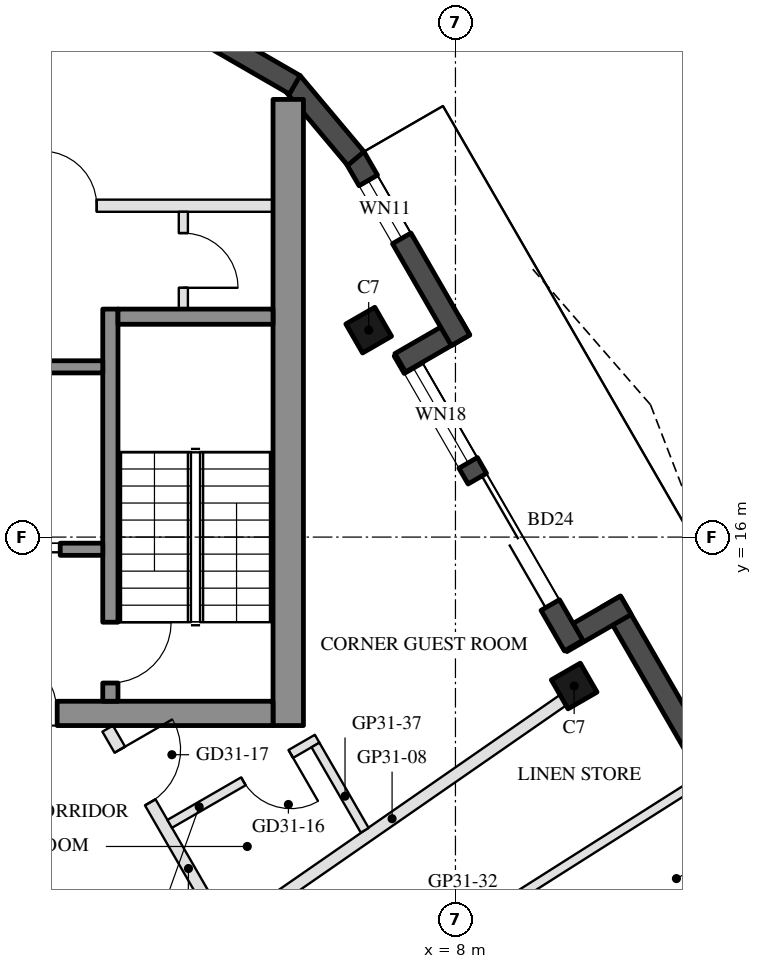
"""IFC4 building model, lengths in metres.
Left out: names, types, materials, properties, quantities, classifications, styles, units other than length and angle.
Written with IfcOpenShell. Run it as: python <this file> out.ifc"""

import sys

from ifc_helpers import new_model, si_unit, direction, frame, frame_2d, origin, origin_2d, place, context, subcontext, project, spatial, rectangle, hollow_rectangle, extrude, boolean, halfspace, element, fill, save


model = new_model("IFC4")
c1 = context("Model", 3, precision=1e-05, world=origin(), true_north=direction((0.0, 1.0)))
c2 = subcontext(c1, "Body", "Model", "MODEL_VIEW")
j1 = project(units=[si_unit("LENGTHUNIT", "METRE"), si_unit("PLANEANGLEUNIT", "RADIAN")], contexts=[c1])
p1 = place(None, origin())
s1 = spatial("IfcSite", under=j1, at=p1, CompositionType="ELEMENT")
p2 = place(p1, origin())
s2 = spatial("IfcBuilding", under=s1, at=p2, CompositionType="ELEMENT")
p3 = place(p2, frame((0.0, 0.0, 302.2)))
s3 = spatial("IfcBuildingStorey", under=s2, at=p3, CompositionType="ELEMENT", Elevation=302.2)
p4 = place(p3, frame((9.953, 13.551, 0.0), z_axis=(0.0, 0.0, 1.0), x_axis=(-0.5, 0.866025403784, 0.0)))
e1 = element("IfcColumn", 1, at=p4, inside=s3, PredefinedType="COLUMN", context=c2, shape_type="SweptSolid", body=[
    boolean("DIFFERENCE", extrude(hollow_rectangle(XDim=0.55, YDim=0.55, WallThickness=0.025, at=origin_2d()), origin(), (0.0, 0.0, 1.0), 3.7), halfspace(frame((0.0, 0.0, 0.034), z_axis=(0.0, 0.0, 1.0), x_axis=(1.0, 0.0, 0.0)), True)),
])
p5 = place(p3, frame((6.573, 19.404, 0.0), z_axis=(0.0, 0.0, 1.0), x_axis=(-0.5, 0.866025403784, 0.0)))
e2 = element("IfcColumn", 2, at=p5, inside=s3, PredefinedType="COLUMN", context=c2, shape_type="SweptSolid", body=[
    boolean("DIFFERENCE", extrude(hollow_rectangle(XDim=0.55, YDim=0.55, WallThickness=0.025, at=origin_2d()), origin(), (0.0, 0.0, 1.0), 3.7), halfspace(frame((0.0, 0.0, 0.04), z_axis=(0.0, 0.0, 1.0), x_axis=(1.0, 0.0, 0.0)), True)),
])
p6 = place(p3, frame((14.843, 7.531, 0.0), z_axis=(0.0, 0.0, 1.0), x_axis=(-0.500013816581, 0.866017426631, 0.0)))
e3 = element("IfcWall", 3, at=p6, inside=s3, PredefinedType="SOLIDWALL", context=c2, shape_type="SweptSolid", body=[
    extrude(rectangle(XDim=8.559, YDim=0.35, at=frame_2d((4.279, 0.0))), origin(), (0.0, 0.0, 1.0), 3.55),
])
p7 = place(p6, frame((1.525, 0.0, 0.3)))
e4 = element("IfcOpeningElement", 4, at=p7, cuts=e3, PredefinedType="OPENING", context=c2, shape_type="SweptSolid", body=[
    extrude(rectangle(XDim=0.9, YDim=2.65, at=frame_2d((0.45, 1.325))), frame((0.0, 0.185, 0.0), z_axis=(0.0, -1.0, 0.0), x_axis=(1.0, 0.0, 0.0)), (0.0, 0.0, 1.0), 0.37),
])
p8 = place(p3, frame((10.802, 14.879, 0.0), z_axis=(0.0, 0.0, 1.0), x_axis=(-0.866005645448, -0.500034220881, 0.0)))
e5 = element("IfcWall", 5, at=p8, inside=s3, PredefinedType="SOLIDWALL", context=c2, shape_type="SweptSolid", body=[
    extrude(rectangle(XDim=1.22, YDim=0.35, at=frame_2d((0.61, 0.0))), origin(), (0.0, 0.0, 1.0), 3.55),
])
p9 = place(p3, frame((9.944, 14.216, 0.0), z_axis=(0.0, 0.0, 1.0), x_axis=(-0.500026936782, 0.866009851268, 0.0)))
e6 = element("IfcWall", 6, at=p9, inside=s3, PredefinedType="SOLIDWALL", context=c2, shape_type="SweptSolid", body=[
    extrude(rectangle(XDim=5.599, YDim=0.35, at=frame_2d((2.799, 0.0))), origin(), (0.0, 0.0, 1.0), 3.55),
])
p10 = place(p9, frame((0.77, 0.0, 0.0)))
e7 = element("IfcOpeningElement", 7, at=p10, cuts=e6, PredefinedType="OPENING", context=c2, shape_type="SweptSolid", body=[
    extrude(rectangle(XDim=2.4, YDim=2.4, at=frame_2d((1.2, 1.2))), frame((0.0, 0.185, 0.0), z_axis=(0.0, -1.0, 0.0), x_axis=(1.0, 0.0, 0.0)), (0.0, 0.0, 1.0), 0.37),
])
p11 = place(p9, frame((3.47, 0.0, 0.3)))
e8 = element("IfcOpeningElement", 8, at=p11, cuts=e6, PredefinedType="OPENING", context=c2, shape_type="SweptSolid", body=[
    extrude(rectangle(XDim=1.8, YDim=2.65, at=frame_2d((0.9, 1.325))), frame((0.0, 0.185, 0.0), z_axis=(0.0, -1.0, 0.0), x_axis=(1.0, 0.0, 0.0)), (0.0, 0.0, 1.0), 0.37),
])
p12 = place(p3, frame((7.092, 18.866, 0.0), z_axis=(0.0, 0.0, 1.0), x_axis=(0.866005645448, 0.500034220881, 0.0)))
e9 = element("IfcWall", 9, at=p12, inside=s3, PredefinedType="SOLIDWALL", context=c2, shape_type="SweptSolid", body=[
    extrude(rectangle(XDim=1.22, YDim=0.35, at=frame_2d((0.61, 0.0))), origin(), (0.0, 0.0, 1.0), 3.55),
])
p13 = place(p3, frame((8.084, 19.237, 0.0), z_axis=(0.0, 0.0, 1.0), x_axis=(-0.499949154193, 0.866054757635, 0.0)))
e10 = element("IfcWall", 10, at=p13, inside=s3, PredefinedType="SOLIDWALL", context=c2, shape_type="SweptSolid", body=[
    extrude(rectangle(XDim=3.48, YDim=0.35, at=frame_2d((1.74, 0.0))), origin(), (0.0, 0.0, 1.0), 3.55),
])
p14 = place(p13, frame((1.935, 0.0, 0.3)))
e11 = element("IfcOpeningElement", 11, at=p14, cuts=e10, PredefinedType="OPENING", context=c2, shape_type="SweptSolid", body=[
    extrude(rectangle(XDim=1.1, YDim=2.65, at=frame_2d((0.55, 1.325))), frame((0.0, 0.185, 0.0), z_axis=(0.0, -1.0, 0.0), x_axis=(1.0, 0.0, 0.0)), (0.0, 0.0, 1.0), 0.37),
])
p15 = place(p3, frame((6.361, 22.226, 0.0), z_axis=(0.0, 0.0, 1.0), x_axis=(-0.642782014883, 0.766049137682, 0.0)))
e12 = element("IfcWall", 12, at=p15, inside=s3, PredefinedType="SOLIDWALL", context=c2, shape_type="SweptSolid", body=[
    extrude(rectangle(XDim=1.634, YDim=0.35, at=frame_2d((0.817, 0.0))), origin(), (0.0, 0.0, 1.0), 3.55),
])
p16 = place(p3, frame((5.358, 23.439, 0.0), z_axis=(0.0, 0.0, 1.0), x_axis=(-0.866018903231, 0.500011259119, 0.0)))
e13 = element("IfcWall", 13, at=p16, inside=s3, PredefinedType="SOLIDWALL", context=c2, shape_type="SweptSolid", body=[
    extrude(rectangle(XDim=1.634, YDim=0.35, at=frame_2d((0.817, 0.0))), origin(), (0.0, 0.0, 1.0), 3.55),
])
p17 = place(p3, frame((5.25, 12.9, 0.0), z_axis=(0.0, 0.0, 1.0), x_axis=(0.0, 1.0, 0.0)))
e14 = element("IfcWall", 14, at=p17, inside=s3, PredefinedType="SHEAR", context=c2, shape_type="SweptSolid", body=[
    extrude(rectangle(XDim=10.299, YDim=0.5, at=frame_2d((5.149, 0.0))), origin(), (0.0, 0.0, 1.0), 3.5),
])
p18 = place(p3, frame((5.0, 13.1, 0.0), z_axis=(0.0, 0.0, 1.0), x_axis=(-1.0, 0.0, 0.0)))
e15 = element("IfcWall", 15, at=p18, inside=s3, PredefinedType="SHEAR", context=c2, shape_type="SweptSolid", body=[
    extrude(rectangle(XDim=10.0, YDim=0.4, at=frame_2d((5.0, 0.0))), origin(), (0.0, 0.0, 1.0), 3.5),
])
p19 = place(p18, frame((3.55, 0.0, 0.0)))
e16 = element("IfcOpeningElement", 16, at=p19, cuts=e15, PredefinedType="OPENING", context=c2, shape_type="SweptSolid", body=[
    extrude(rectangle(XDim=1.1, YDim=2.1, at=frame_2d((0.55, 1.05))), frame((0.0, 0.21, 0.0), z_axis=(0.0, -1.0, 0.0), x_axis=(1.0, 0.0, 0.0)), (0.0, 0.0, 1.0), 0.42),
])
p20 = place(p18, frame((5.85, 0.0, 0.0)))
e17 = element("IfcOpeningElement", 17, at=p20, cuts=e15, PredefinedType="OPENING", context=c2, shape_type="SweptSolid", body=[
    extrude(rectangle(XDim=1.4, YDim=2.1, at=frame_2d((0.7, 1.05))), frame((0.0, 0.21, 0.0), z_axis=(0.0, -1.0, 0.0), x_axis=(1.0, 0.0, 0.0)), (0.0, 0.0, 1.0), 0.42),
])
p21 = place(p3, frame((2.325, 13.3, 0.0), z_axis=(0.0, 0.0, 1.0), x_axis=(0.0, 1.0, 0.0)))
e18 = element("IfcWall", 18, at=p21, inside=s3, PredefinedType="SHEAR", context=c2, shape_type="SweptSolid", body=[
    extrude(rectangle(XDim=6.45, YDim=0.25, at=frame_2d((3.225, 0.0))), origin(), (0.0, 0.0, 1.0), 3.5),
])
p22 = place(p21, frame((0.3, 0.0, 0.0)))
e19 = element("IfcOpeningElement", 19, at=p22, cuts=e18, PredefinedType="OPENING", context=c2, shape_type="SweptSolid", body=[
    extrude(rectangle(XDim=1.0, YDim=2.1, at=frame_2d((0.5, 1.05))), frame((0.0, 0.135, 0.0), z_axis=(0.0, -1.0, 0.0), x_axis=(1.0, 0.0, 0.0)), (0.0, 0.0, 1.0), 0.27),
])
p23 = place(p3, frame((5.0, 19.625, 0.0), z_axis=(0.0, 0.0, 1.0), x_axis=(-1.0, 0.0, 0.0)))
e20 = element("IfcWall", 20, at=p23, inside=s3, PredefinedType="SHEAR", context=c2, shape_type="SweptSolid", body=[
    extrude(rectangle(XDim=2.55, YDim=0.25, at=frame_2d((1.275, 0.0))), origin(), (0.0, 0.0, 1.0), 3.5),
])
p24 = place(p3, frame((2.2, 18.8, 0.0), z_axis=(0.0, 0.0, 1.0), x_axis=(-1.0, 0.0, 0.0)))
e21 = element("IfcWall", 21, at=p24, inside=s3, PredefinedType="SHEAR", context=c2, shape_type="SweptSolid", body=[
    extrude(rectangle(XDim=2.8, YDim=0.2, at=frame_2d((1.4, 0.0))), origin(), (0.0, 0.0, 1.0), 3.5),
])
p25 = place(p3, frame((2.2, 15.8, 0.0), z_axis=(0.0, 0.0, 1.0), x_axis=(-1.0, 0.0, 0.0)))
e22 = element("IfcWall", 22, at=p25, inside=s3, PredefinedType="SHEAR", context=c2, shape_type="SweptSolid", body=[
    extrude(rectangle(XDim=2.8, YDim=0.2, at=frame_2d((1.4, 0.0))), origin(), (0.0, 0.0, 1.0), 3.5),
])
p26 = place(p25, frame((0.7, 0.0, 0.0)))
e23 = element("IfcOpeningElement", 23, at=p26, cuts=e22, PredefinedType="OPENING", context=c2, shape_type="SweptSolid", body=[
    extrude(rectangle(XDim=1.2, YDim=2.1, at=frame_2d((0.6, 1.05))), frame((0.0, 0.11, 0.0), z_axis=(0.0, -1.0, 0.0), x_axis=(1.0, 0.0, 0.0)), (0.0, 0.0, 1.0), 0.22),
])
p27 = place(p3, frame((5.0, 21.45, 0.0), z_axis=(0.0, 0.0, 1.0), x_axis=(-1.0, 0.0, 0.0)))
e24 = element("IfcWall", 24, at=p27, inside=s3, PredefinedType="PARTITIONING", context=c2, shape_type="SweptSolid", body=[
    extrude(rectangle(XDim=5.4, YDim=0.2, at=frame_2d((2.7, 0.0))), origin(), (0.0, 0.0, 1.0), 3.5),
])
p28 = place(p27, frame((2.9, 0.0, 0.0)))
e25 = element("IfcOpeningElement", 25, at=p28, cuts=e24, PredefinedType="OPENING", context=c2, shape_type="SweptSolid", body=[
    extrude(rectangle(XDim=0.9, YDim=2.1, at=frame_2d((0.45, 1.05))), frame((0.0, 0.11, 0.0), z_axis=(0.0, -1.0, 0.0), x_axis=(1.0, 0.0, 0.0)), (0.0, 0.0, 1.0), 0.22),
])
p29 = place(p3, frame((3.525, 19.75, 0.0), z_axis=(0.0, 0.0, 1.0), x_axis=(0.0, 1.0, 0.0)))
e26 = element("IfcWall", 26, at=p29, inside=s3, PredefinedType="PARTITIONING", context=c2, shape_type="SweptSolid", body=[
    extrude(rectangle(XDim=1.6, YDim=0.15, at=frame_2d((0.8, 0.0))), origin(), (0.0, 0.0, 1.0), 3.5),
])
p30 = place(p29, frame((0.35, 0.0, 0.0)))
e27 = element("IfcOpeningElement", 27, at=p30, cuts=e26, PredefinedType="OPENING", context=c2, shape_type="SweptSolid", body=[
    extrude(rectangle(XDim=0.9, YDim=2.1, at=frame_2d((0.45, 1.05))), frame((0.0, 0.085, 0.0), z_axis=(0.0, -1.0, 0.0), x_axis=(1.0, 0.0, 0.0)), (0.0, 0.0, 1.0), 0.17),
])
p31 = place(p3, frame((9.769, 13.318, 0.0), z_axis=(0.0, 0.0, 1.0), x_axis=(-0.821728251777, -0.569879531332, 0.0)))
e28 = element("IfcWall", 28, at=p31, inside=s3, PredefinedType="PARTITIONING", context=c2, shape_type="SweptSolid", body=[
    extrude(rectangle(XDim=6.843, YDim=0.2, at=frame_2d((3.421, 0.0))), origin(), (0.0, 0.0, 1.0), 3.1),
])
p32 = place(p3, frame((12.052, 12.015, 0.0), z_axis=(0.0, 0.0, 1.0), x_axis=(-0.844566720388, -0.535450328987, 0.0)))
e29 = element("IfcWall", 29, at=p32, inside=s3, PredefinedType="PARTITIONING", context=c2, shape_type="SweptSolid", body=[
    extrude(rectangle(XDim=8.152, YDim=0.15, at=frame_2d((4.076, 0.0))), origin(), (0.0, 0.0, 1.0), 3.16),
])
p33 = place(p3, frame((2.281, 12.85, 0.0), z_axis=(0.0, 0.0, 1.0), x_axis=(0.500019354728, -0.866014229038, 0.0)))
e30 = element("IfcWall", 30, at=p33, inside=s3, PredefinedType="PARTITIONING", context=c2, shape_type="SweptSolid", body=[
    extrude(rectangle(XDim=3.796, YDim=0.2, at=frame_2d((1.898, 0.0))), origin(), (0.0, 0.0, 1.0), 3.1),
])
p34 = place(p33, frame((0.4, 0.0, 0.0)))
e31 = element("IfcOpeningElement", 31, at=p34, cuts=e30, PredefinedType="OPENING", context=c2, shape_type="SweptSolid", body=[
    extrude(rectangle(XDim=1.0, YDim=2.1, at=frame_2d((0.5, 1.05))), frame((0.0, 0.11, 0.0), z_axis=(0.0, -1.0, 0.0), x_axis=(1.0, 0.0, 0.0)), (0.0, 0.0, 1.0), 0.22),
])
p35 = place(p3, frame((5.725, 12.683, 0.0), z_axis=(0.0, 0.0, 1.0), x_axis=(-0.866034573852, -0.49998411664, 0.0)))
e32 = element("IfcWall", 32, at=p35, inside=s3, PredefinedType="PARTITIONING", context=c2, shape_type="SweptSolid", body=[
    extrude(rectangle(XDim=2.8, YDim=0.15, at=frame_2d((1.4, 0.0))), origin(), (0.0, 0.0, 1.0), 3.55),
])
p36 = place(p35, frame((0.5, 0.0, 0.0)))
e33 = element("IfcOpeningElement", 33, at=p36, cuts=e32, PredefinedType="OPENING", context=c2, shape_type="SweptSolid", body=[
    extrude(rectangle(XDim=0.9, YDim=2.1, at=frame_2d((0.45, 1.05))), frame((0.0, 0.085, 0.0), z_axis=(0.0, -1.0, 0.0), x_axis=(1.0, 0.0, 0.0)), (0.0, 0.0, 1.0), 0.17),
])
p37 = place(p3, frame((6.508, 11.178, 0.0), z_axis=(0.0, 0.0, 1.0), x_axis=(-0.500061642096, 0.865989811779, 0.0)))
e34 = element("IfcWall", 34, at=p37, inside=s3, PredefinedType="PARTITIONING", context=c2, shape_type="SweptSolid", body=[
    extrude(rectangle(XDim=1.62, YDim=0.15, at=frame_2d((0.81, 0.0))), origin(), (0.0, 0.0, 1.0), 3.1),
])
p38 = place(p10, frame((2.4, 0.0, 0.0), z_axis=(0.0, 0.0, 1.0), x_axis=(-1.0, 0.0, 0.0)))
e35 = element("IfcDoor", 35, at=p38, inside=s3, OperationType="SLIDING_TO_LEFT", PredefinedType="DOOR", context=c2, shape_type="SweptSolid", body=[
    extrude(rectangle(XDim=2.4, YDim=2.4, at=frame_2d((1.2, 1.2))), frame((0.0, 0.025, 0.0), z_axis=(0.0, -1.0, 0.0), x_axis=(1.0, 0.0, 0.0)), (0.0, 0.0, 1.0), 0.05),
])
fill(e7, e35)
p39 = place(p11, origin())
e36 = element("IfcWindow", 36, at=p39, inside=s3, PartitioningType="SINGLE_PANEL", PredefinedType="WINDOW", context=c2, shape_type="SweptSolid", body=[
    extrude(rectangle(XDim=1.8, YDim=2.65, at=frame_2d((0.9, 1.325))), frame((0.0, 0.03, 0.0), z_axis=(0.0, -1.0, 0.0), x_axis=(1.0, 0.0, 0.0)), (0.0, 0.0, 1.0), 0.06),
])
fill(e8, e36)
p40 = place(p14, origin())
e37 = element("IfcWindow", 37, at=p40, inside=s3, PartitioningType="SINGLE_PANEL", PredefinedType="WINDOW", context=c2, shape_type="SweptSolid", body=[
    extrude(rectangle(XDim=1.1, YDim=2.65, at=frame_2d((0.55, 1.325))), frame((0.0, 0.03, 0.0), z_axis=(0.0, -1.0, 0.0), x_axis=(1.0, 0.0, 0.0)), (0.0, 0.0, 1.0), 0.06),
])
fill(e11, e37)
p41 = place(p26, origin())
e38 = element("IfcDoor", 38, at=p41, inside=s3, OperationType="DOUBLE_DOOR_SLIDING", PredefinedType="DOOR", context=c2, shape_type="SweptSolid", body=[
    extrude(rectangle(XDim=1.2, YDim=2.1, at=frame_2d((0.6, 1.05))), frame((0.0, 0.025, 0.0), z_axis=(0.0, -1.0, 0.0), x_axis=(1.0, 0.0, 0.0)), (0.0, 0.0, 1.0), 0.05),
])
fill(e23, e38)
p42 = place(p30, frame((0.9, 0.0, 0.0), z_axis=(0.0, 0.0, 1.0), x_axis=(-1.0, 0.0, 0.0)))
e39 = element("IfcDoor", 39, at=p42, inside=s3, OperationType="SINGLE_SWING_RIGHT", PredefinedType="DOOR", context=c2, shape_type="SweptSolid", body=[
    extrude(rectangle(XDim=0.9, YDim=2.1, at=frame_2d((0.45, 1.05))), frame((0.0, 0.025, 0.0), z_axis=(0.0, -1.0, 0.0), x_axis=(1.0, 0.0, 0.0)), (0.0, 0.0, 1.0), 0.05),
])
fill(e27, e39)
p43 = place(p28, frame((0.9, 0.0, 0.0), z_axis=(0.0, 0.0, 1.0), x_axis=(-1.0, 0.0, 0.0)))
e40 = element("IfcDoor", 40, at=p43, inside=s3, OperationType="SINGLE_SWING_LEFT", PredefinedType="DOOR", context=c2, shape_type="SweptSolid", body=[
    extrude(rectangle(XDim=0.9, YDim=2.1, at=frame_2d((0.45, 1.05))), frame((0.0, 0.025, 0.0), z_axis=(0.0, -1.0, 0.0), x_axis=(1.0, 0.0, 0.0)), (0.0, 0.0, 1.0), 0.05),
])
fill(e25, e40)
p44 = place(p19, frame((1.1, 0.0, 0.0), z_axis=(0.0, 0.0, 1.0), x_axis=(-1.0, 0.0, 0.0)))
e41 = element("IfcDoor", 41, at=p44, inside=s3, OperationType="SINGLE_SWING_LEFT", PredefinedType="DOOR", context=c2, shape_type="SweptSolid", body=[
    extrude(rectangle(XDim=1.1, YDim=2.1, at=frame_2d((0.55, 1.05))), frame((0.0, 0.025, 0.0), z_axis=(0.0, -1.0, 0.0), x_axis=(1.0, 0.0, 0.0)), (0.0, 0.0, 1.0), 0.05),
])
fill(e16, e41)
p45 = place(p22, frame((1.0, 0.0, 0.0), z_axis=(0.0, 0.0, 1.0), x_axis=(-1.0, 0.0, 0.0)))
e42 = element("IfcDoor", 42, at=p45, inside=s3, OperationType="SINGLE_SWING_LEFT", PredefinedType="DOOR", context=c2, shape_type="SweptSolid", body=[
    extrude(rectangle(XDim=1.0, YDim=2.1, at=frame_2d((0.5, 1.05))), frame((0.0, 0.025, 0.0), z_axis=(0.0, -1.0, 0.0), x_axis=(1.0, 0.0, 0.0)), (0.0, 0.0, 1.0), 0.05),
])
fill(e19, e42)
p46 = place(p36, origin())
e43 = element("IfcDoor", 43, at=p46, inside=s3, OperationType="SINGLE_SWING_LEFT", PredefinedType="DOOR", context=c2, shape_type="SweptSolid", body=[
    extrude(rectangle(XDim=0.9, YDim=2.1, at=frame_2d((0.45, 1.05))), frame((0.0, 0.025, 0.0), z_axis=(0.0, -1.0, 0.0), x_axis=(1.0, 0.0, 0.0)), (0.0, 0.0, 1.0), 0.05),
])
fill(e33, e43)
p47 = place(p34, origin())
e44 = element("IfcDoor", 44, at=p47, inside=s3, OperationType="SINGLE_SWING_LEFT", PredefinedType="DOOR", context=c2, shape_type="SweptSolid", body=[
    extrude(rectangle(XDim=1.0, YDim=2.1, at=frame_2d((0.5, 1.05))), frame((0.0, 0.025, 0.0), z_axis=(0.0, -1.0, 0.0), x_axis=(1.0, 0.0, 0.0)), (0.0, 0.0, 1.0), 0.05),
])
fill(e31, e44)
save(model, sys.argv[1])
